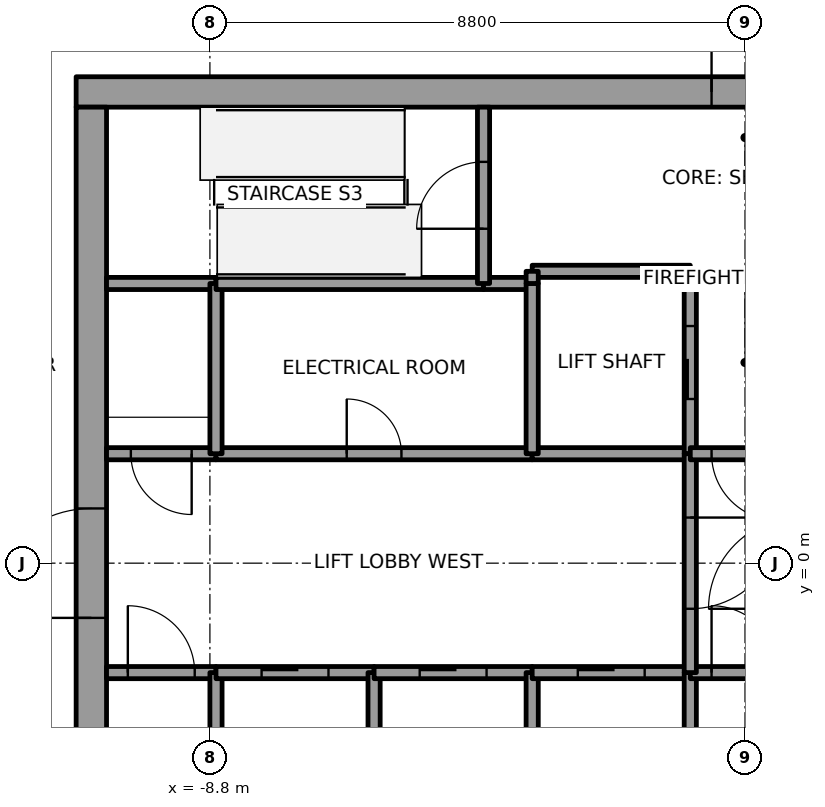
"""IFC4 building model, lengths in metres.
Left out: names, types, materials, properties, quantities, classifications, styles, units other than length and angle.
Written with IfcOpenShell. Run it as: python <this file> out.ifc"""

import sys

from ifc_helpers import new_model, si_unit, direction, frame, frame_2d, origin, place, context, subcontext, project, spatial, rectangle, extrude, element, fill, save


model = new_model("IFC4")
c1 = context("Model", 3, precision=1e-05, world=origin(), true_north=direction((0.0, 1.0)))
c2 = subcontext(c1, "Body", "Model", "MODEL_VIEW")
j1 = project(units=[si_unit("LENGTHUNIT", "METRE"), si_unit("PLANEANGLEUNIT", "RADIAN")], contexts=[c1])
p1 = place(None, origin())
s1 = spatial("IfcSite", under=j1, at=p1, CompositionType="ELEMENT")
p2 = place(p1, origin())
s2 = spatial("IfcBuilding", under=s1, at=p2, CompositionType="ELEMENT")
p3 = place(p2, frame((0.0, 0.0, 251.0)))
s3 = spatial("IfcBuildingStorey", under=s2, at=p3, CompositionType="ELEMENT", Elevation=251.0)
p4 = place(p3, frame((-11.0, 7.75, 0.0), z_axis=(0.0, 0.0, 1.0), x_axis=(1.0, 0.0, 0.0)))
e1 = element("IfcWall", 1, at=p4, inside=s3, PredefinedType="SHEAR", context=c2, shape_type="SweptSolid", body=[
    extrude(rectangle(XDim=22.0, YDim=0.5, at=frame_2d((11.0, 0.0))), origin(), (0.0, 0.0, 1.0), 4.0),
])
p5 = place(p4, frame((10.45, 0.0, 0.0)))
e2 = element("IfcOpeningElement", 2, at=p5, cuts=e1, PredefinedType="OPENING", context=c2, shape_type="SweptSolid", body=[
    extrude(rectangle(XDim=1.1, YDim=2.1, at=frame_2d((0.55, 1.05))), frame((0.0, 0.25, 0.0), z_axis=(0.0, -1.0, 0.0), x_axis=(1.0, 0.0, 0.0)), (0.0, 0.0, 1.0), 0.5),
])
p6 = place(p3, frame((-10.75, -7.5, 0.0), z_axis=(0.0, 0.0, 1.0), x_axis=(0.0, 1.0, 0.0)))
e3 = element("IfcWall", 3, at=p6, inside=s3, PredefinedType="SHEAR", context=c2, shape_type="SweptSolid", body=[
    extrude(rectangle(XDim=15.0, YDim=0.5, at=frame_2d((7.5, 0.0))), origin(), (0.0, 0.0, 1.0), 4.0),
])
p7 = place(p6, frame((6.6, 0.0, 0.0)))
e4 = element("IfcOpeningElement", 4, at=p7, cuts=e3, PredefinedType="OPENING", context=c2, shape_type="SweptSolid", body=[
    extrude(rectangle(XDim=1.8, YDim=2.1, at=frame_2d((0.9, 1.05))), frame((0.0, 0.25, 0.0), z_axis=(0.0, -1.0, 0.0), x_axis=(1.0, 0.0, 0.0)), (0.0, 0.0, 1.0), 0.5),
])
p8 = place(p3, frame((-10.5, -1.8, 0.0), z_axis=(0.0, 0.0, 1.0), x_axis=(1.0, 0.0, 0.0)))
e5 = element("IfcWall", 5, at=p8, inside=s3, PredefinedType="SOLIDWALL", context=c2, shape_type="SweptSolid", body=[
    extrude(rectangle(XDim=1.8, YDim=0.2, at=frame_2d((0.9, 0.0))), origin(), (0.0, 0.0, 1.0), 3.85),
])
p9 = place(p8, frame((0.35, 0.0, 0.0)))
e6 = element("IfcOpeningElement", 6, at=p9, cuts=e5, PredefinedType="OPENING", context=c2, shape_type="SweptSolid", body=[
    extrude(rectangle(XDim=1.1, YDim=2.1, at=frame_2d((0.55, 1.05))), frame((0.0, 0.1, 0.0), z_axis=(0.0, -1.0, 0.0), x_axis=(1.0, 0.0, 0.0)), (0.0, 0.0, 1.0), 0.2),
])
p10 = place(p3, frame((-8.7, 1.8, 0.0), z_axis=(0.0, 0.0, 1.0), x_axis=(-1.0, 0.0, 0.0)))
e7 = element("IfcWall", 7, at=p10, inside=s3, PredefinedType="SOLIDWALL", context=c2, shape_type="SweptSolid", body=[
    extrude(rectangle(XDim=1.8, YDim=0.2, at=frame_2d((0.9, 0.0))), origin(), (0.0, 0.0, 1.0), 3.85),
])
p11 = place(p10, frame((0.4, 0.0, 0.0)))
e8 = element("IfcOpeningElement", 8, at=p11, cuts=e7, PredefinedType="OPENING", context=c2, shape_type="SweptSolid", body=[
    extrude(rectangle(XDim=1.0, YDim=2.1, at=frame_2d((0.5, 1.05))), frame((0.0, 0.1, 0.0), z_axis=(0.0, -1.0, 0.0), x_axis=(1.0, 0.0, 0.0)), (0.0, 0.0, 1.0), 0.2),
])
p12 = place(p3, frame((-8.7, 4.6, 0.0), z_axis=(0.0, 0.0, 1.0), x_axis=(-1.0, 0.0, 0.0)))
e9 = element("IfcWall", 9, at=p12, inside=s3, PredefinedType="SOLIDWALL", context=c2, shape_type="SweptSolid", body=[
    extrude(rectangle(XDim=1.8, YDim=0.2, at=frame_2d((0.9, 0.0))), origin(), (0.0, 0.0, 1.0), 3.85),
])
p13 = place(p3, frame((-8.7, -4.6, 0.0), z_axis=(0.0, 0.0, 1.0), x_axis=(0.0, 1.0, 0.0)))
e10 = element("IfcWall", 10, at=p13, inside=s3, PredefinedType="SOLIDWALL", context=c2, shape_type="SweptSolid", body=[
    extrude(rectangle(XDim=2.8, YDim=0.2, at=frame_2d((1.4, 0.0))), origin(), (0.0, 0.0, 1.0), 3.85),
])
p14 = place(p3, frame((-8.7, -1.8, 0.0), z_axis=(0.0, 0.0, 1.0), x_axis=(1.0, 0.0, 0.0)))
e11 = element("IfcWall", 11, at=p14, inside=s3, PredefinedType="SOLIDWALL", context=c2, shape_type="SweptSolid", body=[
    extrude(rectangle(XDim=2.6, YDim=0.2, at=frame_2d((1.3, 0.0))), origin(), (0.0, 0.0, 1.0), 3.85),
])
p15 = place(p14, frame((0.75, 0.0, 0.0)))
e12 = element("IfcOpeningElement", 12, at=p15, cuts=e11, PredefinedType="OPENING", context=c2, shape_type="SweptSolid", body=[
    extrude(rectangle(XDim=1.1, YDim=2.1, at=frame_2d((0.55, 1.05))), frame((0.0, 0.1, 0.0), z_axis=(0.0, -1.0, 0.0), x_axis=(1.0, 0.0, 0.0)), (0.0, 0.0, 1.0), 0.2),
])
p16 = place(p3, frame((-8.7, 1.8, 0.0), z_axis=(0.0, 0.0, 1.0), x_axis=(1.0, 0.0, 0.0)))
e13 = element("IfcWall", 13, at=p16, inside=s3, PredefinedType="SOLIDWALL", context=c2, shape_type="SweptSolid", body=[
    extrude(rectangle(XDim=5.2, YDim=0.2, at=frame_2d((2.6, 0.0))), origin(), (0.0, 0.0, 1.0), 3.85),
])
p17 = place(p16, frame((2.15, 0.0, 0.0)))
e14 = element("IfcOpeningElement", 14, at=p17, cuts=e13, PredefinedType="OPENING", context=c2, shape_type="SweptSolid", body=[
    extrude(rectangle(XDim=0.9, YDim=2.1, at=frame_2d((0.45, 1.05))), frame((0.0, 0.1, 0.0), z_axis=(0.0, -1.0, 0.0), x_axis=(1.0, 0.0, 0.0)), (0.0, 0.0, 1.0), 0.2),
])
p18 = place(p3, frame((-8.7, 4.6, 0.0), z_axis=(0.0, 0.0, 1.0), x_axis=(0.0, -1.0, 0.0)))
e15 = element("IfcWall", 15, at=p18, inside=s3, PredefinedType="SOLIDWALL", context=c2, shape_type="SweptSolid", body=[
    extrude(rectangle(XDim=2.8, YDim=0.2, at=frame_2d((1.4, 0.0))), origin(), (0.0, 0.0, 1.0), 3.85),
])
p19 = place(p3, frame((-4.3, 4.6, 0.0), z_axis=(0.0, 0.0, 1.0), x_axis=(-1.0, 0.0, 0.0)))
e16 = element("IfcWall", 16, at=p19, inside=s3, PredefinedType="SOLIDWALL", context=c2, shape_type="SweptSolid", body=[
    extrude(rectangle(XDim=4.4, YDim=0.2, at=frame_2d((2.2, 0.0))), origin(), (0.0, 0.0, 1.0), 3.85),
])
p20 = place(p3, frame((-6.1, -4.6, 0.0), z_axis=(0.0, 0.0, 1.0), x_axis=(0.0, 1.0, 0.0)))
e17 = element("IfcWall", 17, at=p20, inside=s3, PredefinedType="SOLIDWALL", context=c2, shape_type="SweptSolid", body=[
    extrude(rectangle(XDim=2.8, YDim=0.2, at=frame_2d((1.4, 0.0))), origin(), (0.0, 0.0, 1.0), 3.85),
])
p21 = place(p3, frame((-6.1, -1.8, 0.0), z_axis=(0.0, 0.0, 1.0), x_axis=(1.0, 0.0, 0.0)))
e18 = element("IfcWall", 18, at=p21, inside=s3, PredefinedType="SOLIDWALL", context=c2, shape_type="SweptSolid", body=[
    extrude(rectangle(XDim=2.6, YDim=0.2, at=frame_2d((1.3, 0.0))), origin(), (0.0, 0.0, 1.0), 3.85),
])
p22 = place(p21, frame((0.75, 0.0, 0.0)))
e19 = element("IfcOpeningElement", 19, at=p22, cuts=e18, PredefinedType="OPENING", context=c2, shape_type="SweptSolid", body=[
    extrude(rectangle(XDim=1.1, YDim=2.1, at=frame_2d((0.55, 1.05))), frame((0.0, 0.1, 0.0), z_axis=(0.0, -1.0, 0.0), x_axis=(1.0, 0.0, 0.0)), (0.0, 0.0, 1.0), 0.2),
])
p23 = place(p3, frame((-3.5, 4.6, 0.0), z_axis=(0.0, 0.0, 1.0), x_axis=(-1.0, 0.0, 0.0)))
e20 = element("IfcWall", 20, at=p23, inside=s3, PredefinedType="SOLIDWALL", context=c2, shape_type="SweptSolid", body=[
    extrude(rectangle(XDim=0.8, YDim=0.2, at=frame_2d((0.4, 0.0))), origin(), (0.0, 0.0, 1.0), 3.85),
])
p24 = place(p3, frame((-4.3, 4.6, 0.0), z_axis=(0.0, 0.0, 1.0), x_axis=(0.0, 1.0, 0.0)))
e21 = element("IfcWall", 21, at=p24, inside=s3, PredefinedType="SOLIDWALL", context=c2, shape_type="SweptSolid", body=[
    extrude(rectangle(XDim=2.9, YDim=0.2, at=frame_2d((1.45, 0.0))), origin(), (0.0, 0.0, 1.0), 3.85),
])
p25 = place(p24, frame((0.9, 0.0, 0.0)))
e22 = element("IfcOpeningElement", 22, at=p25, cuts=e21, PredefinedType="OPENING", context=c2, shape_type="SweptSolid", body=[
    extrude(rectangle(XDim=1.1, YDim=2.1, at=frame_2d((0.55, 1.05))), frame((0.0, 0.1, 0.0), z_axis=(0.0, -1.0, 0.0), x_axis=(1.0, 0.0, 0.0)), (0.0, 0.0, 1.0), 0.2),
])
p26 = place(p3, frame((-3.5, -4.6, 0.0), z_axis=(0.0, 0.0, 1.0), x_axis=(0.0, 1.0, 0.0)))
e23 = element("IfcWall", 23, at=p26, inside=s3, PredefinedType="SOLIDWALL", context=c2, shape_type="SweptSolid", body=[
    extrude(rectangle(XDim=2.8, YDim=0.2, at=frame_2d((1.4, 0.0))), origin(), (0.0, 0.0, 1.0), 3.85),
])
p27 = place(p3, frame((-3.5, -1.8, 0.0), z_axis=(0.0, 0.0, 1.0), x_axis=(1.0, 0.0, 0.0)))
e24 = element("IfcWall", 24, at=p27, inside=s3, PredefinedType="SOLIDWALL", context=c2, shape_type="SweptSolid", body=[
    extrude(rectangle(XDim=2.6, YDim=0.2, at=frame_2d((1.3, 0.0))), origin(), (0.0, 0.0, 1.0), 3.85),
])
p28 = place(p27, frame((0.75, 0.0, 0.0)))
e25 = element("IfcOpeningElement", 25, at=p28, cuts=e24, PredefinedType="OPENING", context=c2, shape_type="SweptSolid", body=[
    extrude(rectangle(XDim=1.1, YDim=2.1, at=frame_2d((0.55, 1.05))), frame((0.0, 0.1, 0.0), z_axis=(0.0, -1.0, 0.0), x_axis=(1.0, 0.0, 0.0)), (0.0, 0.0, 1.0), 0.2),
])
p29 = place(p3, frame((-0.9, 1.8, 0.0), z_axis=(0.0, 0.0, 1.0), x_axis=(-1.0, 0.0, 0.0)))
e26 = element("IfcWall", 26, at=p29, inside=s3, PredefinedType="SOLIDWALL", context=c2, shape_type="SweptSolid", body=[
    extrude(rectangle(XDim=2.6, YDim=0.2, at=frame_2d((1.3, 0.0))), origin(), (0.0, 0.0, 1.0), 3.85),
])
p30 = place(p3, frame((-3.5, 1.8, 0.0), z_axis=(0.0, 0.0, 1.0), x_axis=(0.0, 1.0, 0.0)))
e27 = element("IfcWall", 27, at=p30, inside=s3, PredefinedType="SOLIDWALL", context=c2, shape_type="SweptSolid", body=[
    extrude(rectangle(XDim=2.8, YDim=0.2, at=frame_2d((1.4, 0.0))), origin(), (0.0, 0.0, 1.0), 3.85),
])
p31 = place(p3, frame((-0.9, 1.8, 0.0), z_axis=(0.0, 0.0, 1.0), x_axis=(0.0, 1.0, 0.0)))
e28 = element("IfcWall", 28, at=p31, inside=s3, PredefinedType="SOLIDWALL", context=c2, shape_type="SweptSolid", body=[
    extrude(rectangle(XDim=3.0, YDim=0.2, at=frame_2d((1.5, 0.0))), origin(), (0.0, 0.0, 1.0), 3.85),
])
p32 = place(p31, frame((0.9, 0.0, 0.0)))
e29 = element("IfcOpeningElement", 29, at=p32, cuts=e28, PredefinedType="OPENING", context=c2, shape_type="SweptSolid", body=[
    extrude(rectangle(XDim=1.2, YDim=2.1, at=frame_2d((0.6, 1.05))), frame((0.0, 0.1, 0.0), z_axis=(0.0, -1.0, 0.0), x_axis=(1.0, 0.0, 0.0)), (0.0, 0.0, 1.0), 0.2),
])
p33 = place(p3, frame((-0.9, 4.8, 0.0), z_axis=(0.0, 0.0, 1.0), x_axis=(-1.0, 0.0, 0.0)))
e30 = element("IfcWall", 30, at=p33, inside=s3, PredefinedType="SOLIDWALL", context=c2, shape_type="SweptSolid", body=[
    extrude(rectangle(XDim=2.6, YDim=0.2, at=frame_2d((1.3, 0.0))), origin(), (0.0, 0.0, 1.0), 3.85),
])
p34 = place(p3, frame((-3.5, 4.8, 0.0), z_axis=(0.0, 0.0, 1.0), x_axis=(0.0, -1.0, 0.0)))
e31 = element("IfcWall", 31, at=p34, inside=s3, PredefinedType="SOLIDWALL", context=c2, shape_type="SweptSolid", body=[
    extrude(rectangle(XDim=0.2, YDim=0.2, at=frame_2d((0.1, 0.0))), origin(), (0.0, 0.0, 1.0), 3.85),
])
p35 = place(p3, frame((-0.9, -4.6, 0.0), z_axis=(0.0, 0.0, 1.0), x_axis=(0.0, 1.0, 0.0)))
e32 = element("IfcWall", 32, at=p35, inside=s3, PredefinedType="SOLIDWALL", context=c2, shape_type="SweptSolid", body=[
    extrude(rectangle(XDim=2.8, YDim=0.2, at=frame_2d((1.4, 0.0))), origin(), (0.0, 0.0, 1.0), 3.85),
])
p36 = place(p3, frame((-0.9, -1.8, 0.0), z_axis=(0.0, 0.0, 1.0), x_axis=(1.0, 0.0, 0.0)))
e33 = element("IfcWall", 33, at=p36, inside=s3, PredefinedType="SOLIDWALL", context=c2, shape_type="SweptSolid", body=[
    extrude(rectangle(XDim=1.8, YDim=0.2, at=frame_2d((0.9, 0.0))), origin(), (0.0, 0.0, 1.0), 3.85),
])
p37 = place(p36, frame((0.35, 0.0, 0.0)))
e34 = element("IfcOpeningElement", 34, at=p37, cuts=e33, PredefinedType="OPENING", context=c2, shape_type="SweptSolid", body=[
    extrude(rectangle(XDim=1.1, YDim=2.1, at=frame_2d((0.55, 1.05))), frame((0.0, 0.1, 0.0), z_axis=(0.0, -1.0, 0.0), x_axis=(1.0, 0.0, 0.0)), (0.0, 0.0, 1.0), 0.2),
])
p38 = place(p3, frame((-0.9, 1.8, 0.0), z_axis=(0.0, 0.0, 1.0), x_axis=(0.0, -1.0, 0.0)))
e35 = element("IfcWall", 35, at=p38, inside=s3, PredefinedType="SOLIDWALL", context=c2, shape_type="SweptSolid", body=[
    extrude(rectangle(XDim=3.6, YDim=0.2, at=frame_2d((1.8, 0.0))), origin(), (0.0, 0.0, 1.0), 3.85),
])
p39 = place(p38, frame((1.05, 0.0, 0.0)))
e36 = element("IfcOpeningElement", 36, at=p39, cuts=e35, PredefinedType="OPENING", context=c2, shape_type="SweptSolid", body=[
    extrude(rectangle(XDim=1.5, YDim=2.1, at=frame_2d((0.75, 1.05))), frame((0.0, 0.1, 0.0), z_axis=(0.0, -1.0, 0.0), x_axis=(1.0, 0.0, 0.0)), (0.0, 0.0, 1.0), 0.2),
])
p40 = place(p3, frame((0.9, 1.8, 0.0), z_axis=(0.0, 0.0, 1.0), x_axis=(-1.0, 0.0, 0.0)))
e37 = element("IfcWall", 37, at=p40, inside=s3, PredefinedType="SOLIDWALL", context=c2, shape_type="SweptSolid", body=[
    extrude(rectangle(XDim=1.8, YDim=0.2, at=frame_2d((0.9, 0.0))), origin(), (0.0, 0.0, 1.0), 3.85),
])
p41 = place(p40, frame((0.35, 0.0, 0.0)))
e38 = element("IfcOpeningElement", 38, at=p41, cuts=e37, PredefinedType="OPENING", context=c2, shape_type="SweptSolid", body=[
    extrude(rectangle(XDim=1.1, YDim=2.1, at=frame_2d((0.55, 1.05))), frame((0.0, 0.1, 0.0), z_axis=(0.0, -1.0, 0.0), x_axis=(1.0, 0.0, 0.0)), (0.0, 0.0, 1.0), 0.2),
])
p42 = place(p15, origin())
e39 = element("IfcDoor", 39, at=p42, inside=s3, OperationType="SLIDING_TO_RIGHT", PredefinedType="DOOR", context=c2, shape_type="SweptSolid", body=[
    extrude(rectangle(XDim=1.1, YDim=2.1, at=frame_2d((0.55, 1.05))), frame((0.0, 0.025, 0.0), z_axis=(0.0, -1.0, 0.0), x_axis=(1.0, 0.0, 0.0)), (0.0, 0.0, 1.0), 0.05),
])
fill(e12, e39)
p43 = place(p22, origin())
e40 = element("IfcDoor", 40, at=p43, inside=s3, OperationType="SLIDING_TO_LEFT", PredefinedType="DOOR", context=c2, shape_type="SweptSolid", body=[
    extrude(rectangle(XDim=1.1, YDim=2.1, at=frame_2d((0.55, 1.05))), frame((0.0, 0.025, 0.0), z_axis=(0.0, -1.0, 0.0), x_axis=(1.0, 0.0, 0.0)), (0.0, 0.0, 1.0), 0.05),
])
fill(e19, e40)
p44 = place(p28, origin())
e41 = element("IfcDoor", 41, at=p44, inside=s3, OperationType="SLIDING_TO_LEFT", PredefinedType="DOOR", context=c2, shape_type="SweptSolid", body=[
    extrude(rectangle(XDim=1.1, YDim=2.1, at=frame_2d((0.55, 1.05))), frame((0.0, 0.025, 0.0), z_axis=(0.0, -1.0, 0.0), x_axis=(1.0, 0.0, 0.0)), (0.0, 0.0, 1.0), 0.05),
])
fill(e25, e41)
p45 = place(p32, origin())
e42 = element("IfcDoor", 42, at=p45, inside=s3, OperationType="SLIDING_TO_RIGHT", PredefinedType="DOOR", context=c2, shape_type="SweptSolid", body=[
    extrude(rectangle(XDim=1.2, YDim=2.1, at=frame_2d((0.6, 1.05))), frame((0.0, 0.025, 0.0), z_axis=(0.0, -1.0, 0.0), x_axis=(1.0, 0.0, 0.0)), (0.0, 0.0, 1.0), 0.05),
])
fill(e29, e42)
p46 = place(p39, origin())
e43 = element("IfcDoor", 43, at=p46, inside=s3, OperationType="DOUBLE_DOOR_SINGLE_SWING", PredefinedType="DOOR", context=c2, shape_type="SweptSolid", body=[
    extrude(rectangle(XDim=1.5, YDim=2.1, at=frame_2d((0.75, 1.05))), frame((0.0, 0.025, 0.0), z_axis=(0.0, -1.0, 0.0), x_axis=(1.0, 0.0, 0.0)), (0.0, 0.0, 1.0), 0.05),
])
fill(e36, e43)
p47 = place(p9, origin())
e44 = element("IfcDoor", 44, at=p47, inside=s3, OperationType="SINGLE_SWING_LEFT", PredefinedType="DOOR", context=c2, shape_type="SweptSolid", body=[
    extrude(rectangle(XDim=1.1, YDim=2.1, at=frame_2d((0.55, 1.05))), frame((0.0, 0.025, 0.0), z_axis=(0.0, -1.0, 0.0), x_axis=(1.0, 0.0, 0.0)), (0.0, 0.0, 1.0), 0.05),
])
fill(e6, e44)
p48 = place(p41, origin())
e45 = element("IfcDoor", 45, at=p48, inside=s3, OperationType="SINGLE_SWING_LEFT", PredefinedType="DOOR", context=c2, shape_type="SweptSolid", body=[
    extrude(rectangle(XDim=1.1, YDim=2.1, at=frame_2d((0.55, 1.05))), frame((0.0, 0.025, 0.0), z_axis=(0.0, -1.0, 0.0), x_axis=(1.0, 0.0, 0.0)), (0.0, 0.0, 1.0), 0.05),
])
fill(e38, e45)
p49 = place(p37, origin())
e46 = element("IfcDoor", 46, at=p49, inside=s3, OperationType="SINGLE_SWING_LEFT", PredefinedType="DOOR", context=c2, shape_type="SweptSolid", body=[
    extrude(rectangle(XDim=1.1, YDim=2.1, at=frame_2d((0.55, 1.05))), frame((0.0, 0.025, 0.0), z_axis=(0.0, -1.0, 0.0), x_axis=(1.0, 0.0, 0.0)), (0.0, 0.0, 1.0), 0.05),
])
fill(e34, e46)
p50 = place(p11, origin())
e47 = element("IfcDoor", 47, at=p50, inside=s3, OperationType="SINGLE_SWING_RIGHT", PredefinedType="DOOR", context=c2, shape_type="SweptSolid", body=[
    extrude(rectangle(XDim=1.0, YDim=2.1, at=frame_2d((0.5, 1.05))), frame((0.0, 0.025, 0.0), z_axis=(0.0, -1.0, 0.0), x_axis=(1.0, 0.0, 0.0)), (0.0, 0.0, 1.0), 0.05),
])
fill(e8, e47)
p51 = place(p25, origin())
e48 = element("IfcDoor", 48, at=p51, inside=s3, OperationType="SINGLE_SWING_RIGHT", PredefinedType="DOOR", context=c2, shape_type="SweptSolid", body=[
    extrude(rectangle(XDim=1.1, YDim=2.1, at=frame_2d((0.55, 1.05))), frame((0.0, 0.025, 0.0), z_axis=(0.0, -1.0, 0.0), x_axis=(1.0, 0.0, 0.0)), (0.0, 0.0, 1.0), 0.05),
])
fill(e22, e48)
p52 = place(p17, origin())
e49 = element("IfcDoor", 49, at=p52, inside=s3, OperationType="SINGLE_SWING_RIGHT", PredefinedType="DOOR", context=c2, shape_type="SweptSolid", body=[
    extrude(rectangle(XDim=0.9, YDim=2.1, at=frame_2d((0.45, 1.05))), frame((0.0, 0.025, 0.0), z_axis=(0.0, -1.0, 0.0), x_axis=(1.0, 0.0, 0.0)), (0.0, 0.0, 1.0), 0.05),
])
fill(e14, e49)
p53 = place(p7, origin())
e50 = element("IfcDoor", 50, at=p53, inside=s3, OperationType="DOUBLE_DOOR_SINGLE_SWING", PredefinedType="DOOR", context=c2, shape_type="SweptSolid", body=[
    extrude(rectangle(XDim=1.8, YDim=2.1, at=frame_2d((0.9, 1.05))), frame((0.0, 0.025, 0.0), z_axis=(0.0, -1.0, 0.0), x_axis=(1.0, 0.0, 0.0)), (0.0, 0.0, 1.0), 0.05),
])
fill(e4, e50)
p54 = place(p5, origin())
e51 = element("IfcDoor", 51, at=p54, inside=s3, OperationType="SINGLE_SWING_LEFT", PredefinedType="DOOR", context=c2, shape_type="SweptSolid", body=[
    extrude(rectangle(XDim=1.1, YDim=2.1, at=frame_2d((0.55, 1.05))), frame((0.0, 0.025, 0.0), z_axis=(0.0, -1.0, 0.0), x_axis=(1.0, 0.0, 0.0)), (0.0, 0.0, 1.0), 0.05),
])
fill(e2, e51)
save(model, sys.argv[1])
